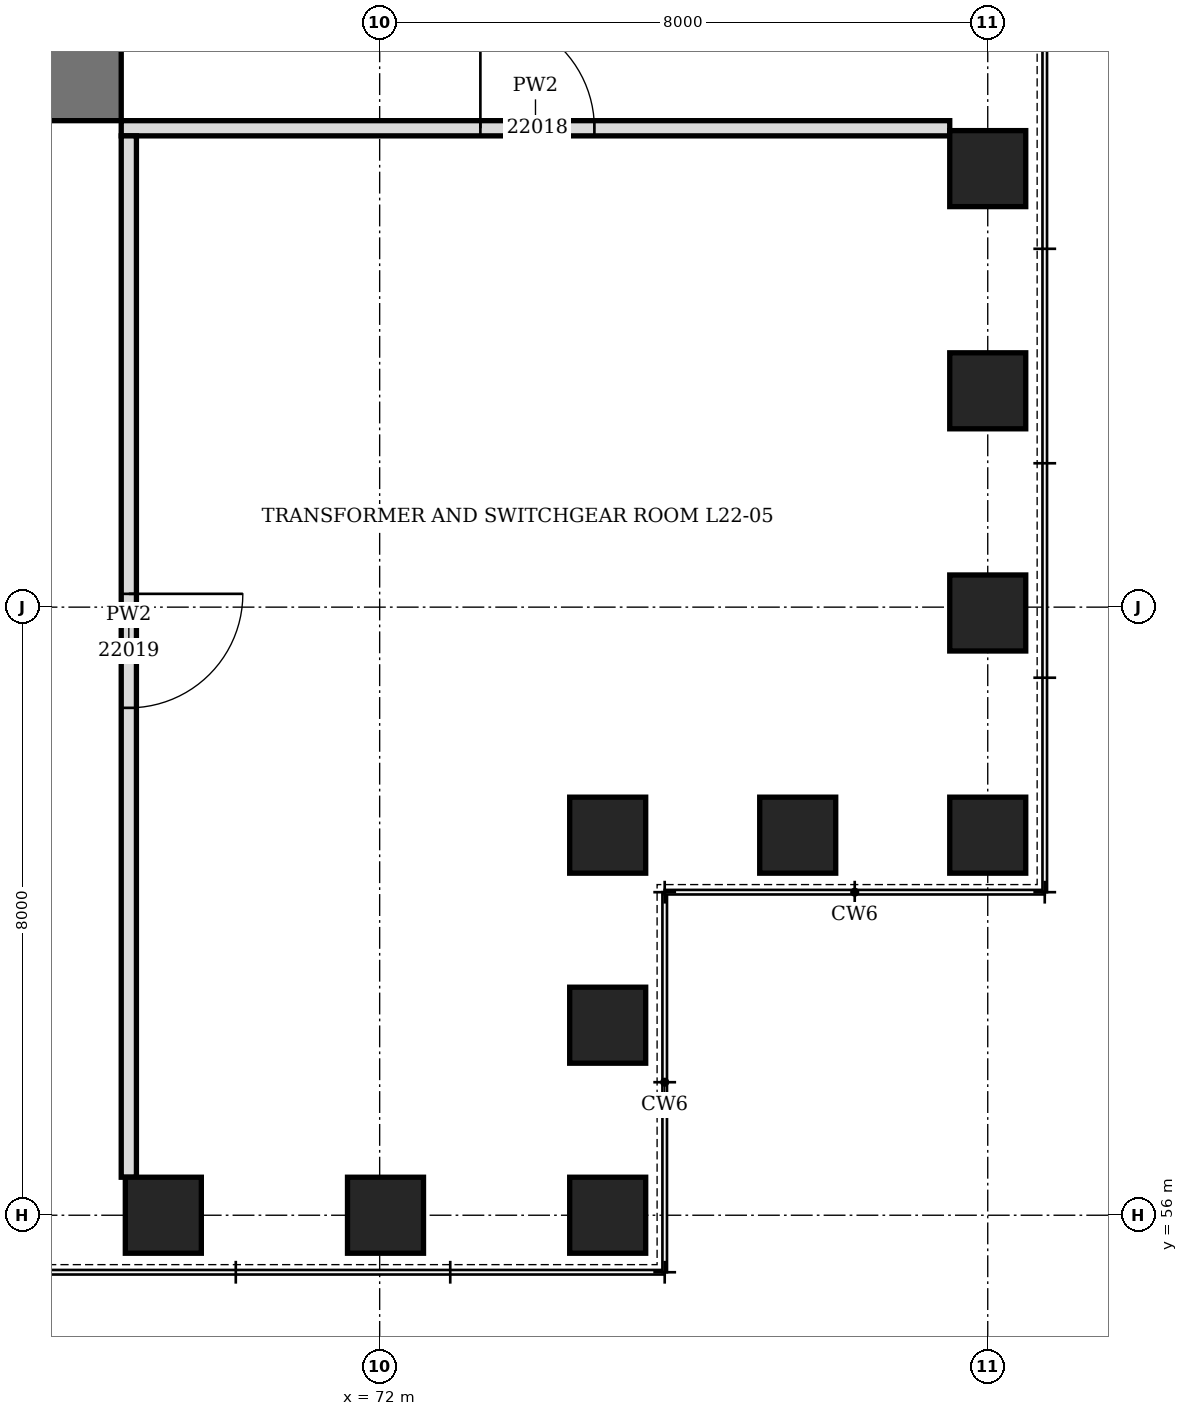
"""IFC4 building model, lengths in metres.
Left out: names, types, materials, properties, quantities, classifications, styles, units other than length and angle.
Written with IfcOpenShell. Run it as: python <this file> out.ifc"""

import sys

from ifc_helpers import new_model, si_unit, direction, frame, frame_2d, origin, origin_2d, place, context, subcontext, project, spatial, rectangle, hollow_rectangle, extrude, element, fill, save


model = new_model("IFC4")
c1 = context("Model", 3, precision=1e-05, world=origin(), true_north=direction((0.0, 1.0)))
c2 = subcontext(c1, "Body", "Model", "MODEL_VIEW")
j1 = project(units=[si_unit("LENGTHUNIT", "METRE"), si_unit("PLANEANGLEUNIT", "RADIAN")], contexts=[c1])
p1 = place(None, origin())
s1 = spatial("IfcSite", under=j1, at=p1, CompositionType="ELEMENT")
p2 = place(p1, origin())
s2 = spatial("IfcBuilding", under=s1, at=p2, CompositionType="ELEMENT")
p3 = place(p2, frame((0.0, 0.0, 102.1)))
s3 = spatial("IfcBuildingStorey", under=s2, at=p3, CompositionType="ELEMENT", Elevation=102.1)
for number, where, z_axis, x_axis in (
    (1, (69.154, 56.0, 0.0), (0.0, 0.0, 1.0), (1.0, 0.0, 0.0)),
    (2, (72.077, 56.0, 0.0), (0.0, 0.0, 1.0), (1.0, 0.0, 0.0)),
    (3, (75.0, 56.0, 0.0), (0.0, 0.0, 1.0), (0.0, 1.0, 0.0)),
    (4, (75.0, 58.5, 0.0), (0.0, 0.0, 1.0), (0.0, 1.0, 0.0)),
    (5, (75.0, 61.0, 0.0), (0.0, 0.0, 1.0), (1.0, 0.0, 0.0)),
    (6, (77.5, 61.0, 0.0), (0.0, 0.0, 1.0), (1.0, 0.0, 0.0)),
    (7, (80.0, 61.0, 0.0), (0.0, 0.0, 1.0), (0.0, 1.0, 0.0)),
    (8, (80.0, 63.923, 0.0), (0.0, 0.0, 1.0), (0.0, 1.0, 0.0)),
    (9, (80.0, 66.846, 0.0), (0.0, 0.0, 1.0), (0.0, 1.0, 0.0)),
    (10, (80.0, 69.769, 0.0), (0.0, 0.0, 1.0), (0.0, 1.0, 0.0)),
):
    element("IfcColumn", number, at=place(p3, frame(where, z_axis=z_axis, x_axis=x_axis)), inside=s3, PredefinedType="COLUMN", context=c2, shape_type="SweptSolid", body=[
        extrude(hollow_rectangle(XDim=1.0, YDim=1.0, WallThickness=0.35, at=origin_2d()), origin(), (0.0, 0.0, 1.0), 5.75),
    ])
p4 = place(p3, frame((68.0, 70.4, 0.0), z_axis=(0.0, 0.0, 1.0), x_axis=(0.0, 1.0, 0.0)))
e11 = element("IfcWall", 11, at=p4, inside=s3, PredefinedType="SHEAR", context=c2, shape_type="SweptSolid", body=[
    extrude(rectangle(XDim=19.2, YDim=1.2, at=frame_2d((9.6, 0.0))), origin(), (0.0, 0.0, 1.0), 6.0),
])
p5 = place(p4, frame((8.6, 0.0, 0.0)))
e12 = element("IfcOpeningElement", 12, at=p5, cuts=e11, PredefinedType="OPENING", context=c2, shape_type="SweptSolid", body=[
    extrude(rectangle(XDim=2.0, YDim=2.4, at=frame_2d((1.0, 1.2))), frame((0.0, 0.61, 0.0), z_axis=(0.0, -1.0, 0.0), x_axis=(1.0, 0.0, 0.0)), (0.0, 0.0, 1.0), 1.22),
])
p6 = place(p3, frame((68.6, 70.3, 0.0), z_axis=(0.0, 0.0, 1.0), x_axis=(1.0, 0.0, 0.0)))
e13 = element("IfcWall", 13, at=p6, inside=s3, PredefinedType="PARTITIONING", context=c2, shape_type="SweptSolid", body=[
    extrude(rectangle(XDim=10.9, YDim=0.2, at=frame_2d((5.45, 0.0))), origin(), (0.0, 0.0, 1.0), 4.25),
])
p7 = place(p6, frame((4.725, 0.0, 0.0)))
e14 = element("IfcOpeningElement", 14, at=p7, cuts=e13, PredefinedType="OPENING", context=c2, shape_type="SweptSolid", body=[
    extrude(rectangle(XDim=1.5, YDim=2.4, at=frame_2d((0.75, 1.2))), frame((0.0, 0.11, 0.0), z_axis=(0.0, -1.0, 0.0), x_axis=(1.0, 0.0, 0.0)), (0.0, 0.0, 1.0), 0.22),
])
p8 = place(p3, frame((68.7, 70.2, 0.0), z_axis=(0.0, 0.0, 1.0), x_axis=(0.0, -1.0, 0.0)))
e15 = element("IfcWall", 15, at=p8, inside=s3, PredefinedType="PARTITIONING", context=c2, shape_type="SweptSolid", body=[
    extrude(rectangle(XDim=13.7, YDim=0.2, at=frame_2d((6.85, 0.0))), origin(), (0.0, 0.0, 1.0), 4.25),
])
p9 = place(p8, frame((6.025, 0.0, 0.0)))
e16 = element("IfcOpeningElement", 16, at=p9, cuts=e15, PredefinedType="OPENING", context=c2, shape_type="SweptSolid", body=[
    extrude(rectangle(XDim=1.5, YDim=2.4, at=frame_2d((0.75, 1.2))), frame((0.0, 0.11, 0.0), z_axis=(0.0, -1.0, 0.0), x_axis=(1.0, 0.0, 0.0)), (0.0, 0.0, 1.0), 0.22),
])
p10 = place(p7, origin())
e17 = element("IfcDoor", 17, at=p10, inside=s3, OperationType="DOUBLE_DOOR_SINGLE_SWING", PredefinedType="DOOR", context=c2, shape_type="SweptSolid", body=[
    extrude(rectangle(XDim=1.5, YDim=2.4, at=frame_2d((0.75, 1.2))), frame((0.0, 0.1, 0.0), z_axis=(0.0, -1.0, 0.0), x_axis=(1.0, 0.0, 0.0)), (0.0, 0.0, 1.0), 0.199),
])
fill(e14, e17)
p11 = place(p9, origin())
e18 = element("IfcDoor", 18, at=p11, inside=s3, OperationType="DOUBLE_DOOR_SINGLE_SWING", PredefinedType="DOOR", context=c2, shape_type="SweptSolid", body=[
    extrude(rectangle(XDim=1.5, YDim=2.4, at=frame_2d((0.75, 1.2))), frame((0.0, 0.1, 0.0), z_axis=(0.0, -1.0, 0.0), x_axis=(1.0, 0.0, 0.0)), (0.0, 0.0, 1.0), 0.199),
])
fill(e16, e18)
save(model, sys.argv[1])
